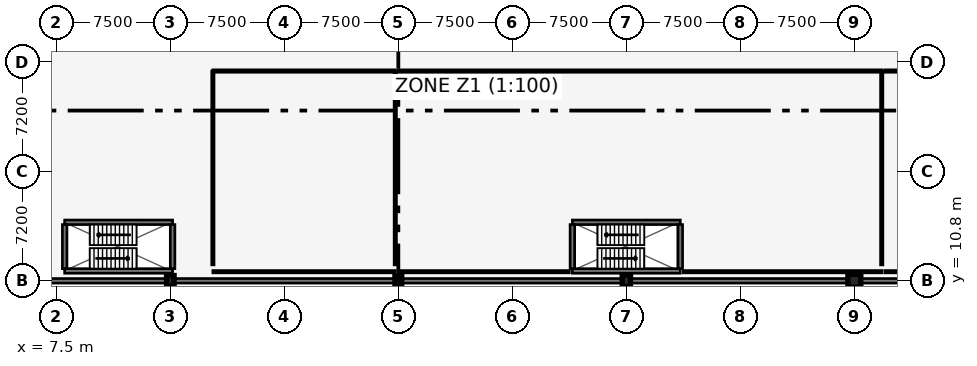
"""IFC4 building model, lengths in metres.
Left out: names, types, materials, properties, quantities, classifications, styles, units other than length and angle.
Written with IfcOpenShell. Run it as: python <this file> out.ifc"""

import sys

from ifc_helpers import new_model, si_unit, direction, frame, frame_2d, origin, origin_2d, place, context, subcontext, project, spatial, rectangle, extrude, element, fill, save


model = new_model("IFC4")
c1 = context("Model", 3, precision=1e-05, world=origin(), true_north=direction((0.0, 1.0)))
c2 = subcontext(c1, "Body", "Model", "MODEL_VIEW")
j1 = project(units=[si_unit("LENGTHUNIT", "METRE"), si_unit("PLANEANGLEUNIT", "RADIAN")], contexts=[c1])
p1 = place(None, origin())
s1 = spatial("IfcSite", under=j1, at=p1, CompositionType="ELEMENT")
p2 = place(p1, origin())
s2 = spatial("IfcBuilding", under=s1, at=p2, CompositionType="ELEMENT")
p3 = place(p2, frame((0.0, 0.0, 4.8)))
s3 = spatial("IfcBuildingStorey", under=s2, at=p3, CompositionType="ELEMENT", Elevation=4.8)
p4 = place(p3, frame((15.0, 10.8, 0.0), z_axis=(0.0, 0.0, 1.0), x_axis=(1.0, 0.0, 0.0)))
e1 = element("IfcColumn", 1, at=p4, inside=s3, PredefinedType="COLUMN", context=c2, shape_type="SweptSolid", body=[
    extrude(rectangle(XDim=0.5, YDim=0.7, at=origin_2d()), origin(), (0.0, 0.0, 1.0), 4.2),
])
p5 = place(p3, frame((30.0, 10.8, 0.0), z_axis=(0.0, 0.0, 1.0), x_axis=(1.0, 0.0, 0.0)))
e2 = element("IfcColumn", 2, at=p5, inside=s3, PredefinedType="COLUMN", context=c2, shape_type="SweptSolid", body=[
    extrude(rectangle(XDim=0.45, YDim=0.6, at=origin_2d()), origin(), (0.0, 0.0, 1.0), 4.2),
])
p6 = place(p3, frame((45.0, 10.8, 0.0), z_axis=(0.0, 0.0, 1.0), x_axis=(1.0, 0.0, 0.0)))
e3 = element("IfcColumn", 3, at=p6, inside=s3, PredefinedType="COLUMN", context=c2, shape_type="SweptSolid", body=[
    extrude(rectangle(XDim=0.55, YDim=0.75, at=origin_2d()), origin(), (0.0, 0.0, 1.0), 4.2),
])
p7 = place(p3, frame((60.0, 10.8, 0.0), z_axis=(0.0, 0.0, 1.0), x_axis=(1.0, 0.0, 0.0)))
e4 = element("IfcColumn", 4, at=p7, inside=s3, PredefinedType="COLUMN", context=c2, shape_type="SweptSolid", body=[
    extrude(rectangle(XDim=0.85, YDim=0.85, at=origin_2d()), origin(), (0.0, 0.0, 1.0), 4.2),
])
p8 = place(p3, frame((0.0, 10.8, 0.0), z_axis=(0.0, 0.0, 1.0), x_axis=(1.0, 0.0, 0.0)))
e5 = element("IfcWall", 5, at=p8, inside=s3, PredefinedType="SOLIDWALL", context=c2, shape_type="SweptSolid", body=[
    extrude(rectangle(XDim=93.6, YDim=0.3, at=frame_2d((46.8, 0.0))), origin(), (0.0, 0.0, 1.0), 3.5),
])
p9 = place(p8, frame((2.2, 0.0, 0.72)))
e6 = element("IfcOpeningElement", 6, at=p9, cuts=e5, PredefinedType="OPENING", context=c2, shape_type="SweptSolid", body=[
    extrude(rectangle(XDim=1.2, YDim=2.0, at=frame_2d((0.6, 1.0))), frame((0.0, 0.16, 0.0), z_axis=(0.0, -1.0, 0.0), x_axis=(1.0, 0.0, 0.0)), (0.0, 0.0, 1.0), 0.32),
])
p10 = place(p8, frame((9.4, 0.0, 0.72)))
e7 = element("IfcOpeningElement", 7, at=p10, cuts=e5, PredefinedType="OPENING", context=c2, shape_type="SweptSolid", body=[
    extrude(rectangle(XDim=1.35, YDim=2.05, at=frame_2d((0.675, 1.025))), frame((0.0, 0.16, 0.0), z_axis=(0.0, -1.0, 0.0), x_axis=(1.0, 0.0, 0.0)), (0.0, 0.0, 1.0), 0.32),
])
p11 = place(p8, frame((16.6, 0.0, 0.72)))
e8 = element("IfcOpeningElement", 8, at=p11, cuts=e5, PredefinedType="OPENING", context=c2, shape_type="SweptSolid", body=[
    extrude(rectangle(XDim=1.5, YDim=2.1, at=frame_2d((0.75, 1.05))), frame((0.0, 0.16, 0.0), z_axis=(0.0, -1.0, 0.0), x_axis=(1.0, 0.0, 0.0)), (0.0, 0.0, 1.0), 0.32),
])
p12 = place(p8, frame((23.8, 0.0, 0.72)))
e9 = element("IfcOpeningElement", 9, at=p12, cuts=e5, PredefinedType="OPENING", context=c2, shape_type="SweptSolid", body=[
    extrude(rectangle(XDim=1.65, YDim=2.1, at=frame_2d((0.825, 1.05))), frame((0.0, 0.16, 0.0), z_axis=(0.0, -1.0, 0.0), x_axis=(1.0, 0.0, 0.0)), (0.0, 0.0, 1.0), 0.32),
])
p13 = place(p8, frame((31.0, 0.0, 0.72)))
e10 = element("IfcOpeningElement", 10, at=p13, cuts=e5, PredefinedType="OPENING", context=c2, shape_type="SweptSolid", body=[
    extrude(rectangle(XDim=1.8, YDim=2.15, at=frame_2d((0.9, 1.075))), frame((0.0, 0.16, 0.0), z_axis=(0.0, -1.0, 0.0), x_axis=(1.0, 0.0, 0.0)), (0.0, 0.0, 1.0), 0.32),
])
p14 = place(p8, frame((38.2, 0.0, 0.72)))
e11 = element("IfcOpeningElement", 11, at=p14, cuts=e5, PredefinedType="OPENING", context=c2, shape_type="SweptSolid", body=[
    extrude(rectangle(XDim=1.2, YDim=2.0, at=frame_2d((0.6, 1.0))), frame((0.0, 0.16, 0.0), z_axis=(0.0, -1.0, 0.0), x_axis=(1.0, 0.0, 0.0)), (0.0, 0.0, 1.0), 0.32),
])
p15 = place(p8, frame((52.6, 0.0, 0.72)))
e12 = element("IfcOpeningElement", 12, at=p15, cuts=e5, PredefinedType="OPENING", context=c2, shape_type="SweptSolid", body=[
    extrude(rectangle(XDim=1.5, YDim=2.1, at=frame_2d((0.75, 1.05))), frame((0.0, 0.16, 0.0), z_axis=(0.0, -1.0, 0.0), x_axis=(1.0, 0.0, 0.0)), (0.0, 0.0, 1.0), 0.32),
])
p16 = place(p8, frame((67.0, 0.0, 0.72)))
e13 = element("IfcOpeningElement", 13, at=p16, cuts=e5, PredefinedType="OPENING", context=c2, shape_type="SweptSolid", body=[
    extrude(rectangle(XDim=1.8, YDim=2.15, at=frame_2d((0.9, 1.075))), frame((0.0, 0.16, 0.0), z_axis=(0.0, -1.0, 0.0), x_axis=(1.0, 0.0, 0.0)), (0.0, 0.0, 1.0), 0.32),
])
p17 = place(p8, frame((81.4, 0.0, 0.72)))
e14 = element("IfcOpeningElement", 14, at=p17, cuts=e5, PredefinedType="OPENING", context=c2, shape_type="SweptSolid", body=[
    extrude(rectangle(XDim=1.35, YDim=2.05, at=frame_2d((0.675, 1.025))), frame((0.0, 0.16, 0.0), z_axis=(0.0, -1.0, 0.0), x_axis=(1.0, 0.0, 0.0)), (0.0, 0.0, 1.0), 0.32),
])
for number, where, z_axis, x_axis in (
    (15, (8.05, 11.45, 0.0), (0.0, 0.0, 1.0), (1.0, 0.0, 0.0)),
    (16, (15.15, 14.65, 0.0), (0.0, 0.0, 1.0), (-1.0, 0.0, 0.0)),
):
    element("IfcWall", number, at=place(p3, frame(where, z_axis=z_axis, x_axis=x_axis)), inside=s3, PredefinedType="SHEAR", context=c2, shape_type="SweptSolid", body=[
        extrude(rectangle(XDim=7.1, YDim=0.3, at=frame_2d((3.55, 0.0))), origin(), (0.0, 0.0, 1.0), 3.9),
    ])
p18 = place(p3, frame((15.15, 11.6, 0.0), z_axis=(0.0, 0.0, 1.0), x_axis=(0.0, 1.0, 0.0)))
e17 = element("IfcWall", 17, at=p18, inside=s3, PredefinedType="SHEAR", context=c2, shape_type="SweptSolid", body=[
    extrude(rectangle(XDim=2.9, YDim=0.3, at=frame_2d((1.45, 0.0))), origin(), (0.0, 0.0, 1.0), 3.9),
])
p19 = place(p3, frame((8.05, 14.5, 0.0), z_axis=(0.0, 0.0, 1.0), x_axis=(0.0, -1.0, 0.0)))
e18 = element("IfcWall", 18, at=p19, inside=s3, PredefinedType="SHEAR", context=c2, shape_type="SweptSolid", body=[
    extrude(rectangle(XDim=2.9, YDim=0.3, at=frame_2d((1.45, 0.0))), origin(), (0.0, 0.0, 1.0), 3.9),
])
p20 = place(p19, frame((0.75, 0.0, 0.0)))
e19 = element("IfcOpeningElement", 19, at=p20, cuts=e18, PredefinedType="OPENING", context=c2, shape_type="SweptSolid", body=[
    extrude(rectangle(XDim=1.05, YDim=2.15, at=frame_2d((0.525, 1.075))), frame((0.0, 0.16, 0.0), z_axis=(0.0, -1.0, 0.0), x_axis=(1.0, 0.0, 0.0)), (0.0, 0.0, 1.0), 0.32),
])
for number, where, z_axis, x_axis in (
    (20, (41.45, 11.45, 0.0), (0.0, 0.0, 1.0), (1.0, 0.0, 0.0)),
    (21, (48.55, 14.65, 0.0), (0.0, 0.0, 1.0), (-1.0, 0.0, 0.0)),
):
    element("IfcWall", number, at=place(p3, frame(where, z_axis=z_axis, x_axis=x_axis)), inside=s3, PredefinedType="SHEAR", context=c2, shape_type="SweptSolid", body=[
        extrude(rectangle(XDim=7.1, YDim=0.3, at=frame_2d((3.55, 0.0))), origin(), (0.0, 0.0, 1.0), 3.9),
    ])
p21 = place(p3, frame((48.55, 11.6, 0.0), z_axis=(0.0, 0.0, 1.0), x_axis=(0.0, 1.0, 0.0)))
e22 = element("IfcWall", 22, at=p21, inside=s3, PredefinedType="SHEAR", context=c2, shape_type="SweptSolid", body=[
    extrude(rectangle(XDim=2.9, YDim=0.3, at=frame_2d((1.45, 0.0))), origin(), (0.0, 0.0, 1.0), 3.9),
])
p22 = place(p3, frame((41.45, 14.5, 0.0), z_axis=(0.0, 0.0, 1.0), x_axis=(0.0, -1.0, 0.0)))
e23 = element("IfcWall", 23, at=p22, inside=s3, PredefinedType="SHEAR", context=c2, shape_type="SweptSolid", body=[
    extrude(rectangle(XDim=2.9, YDim=0.3, at=frame_2d((1.45, 0.0))), origin(), (0.0, 0.0, 1.0), 3.9),
])
p23 = place(p22, frame((0.75, 0.0, 0.0)))
e24 = element("IfcOpeningElement", 24, at=p23, cuts=e23, PredefinedType="OPENING", context=c2, shape_type="SweptSolid", body=[
    extrude(rectangle(XDim=1.05, YDim=2.15, at=frame_2d((0.525, 1.075))), frame((0.0, 0.16, 0.0), z_axis=(0.0, -1.0, 0.0), x_axis=(1.0, 0.0, 0.0)), (0.0, 0.0, 1.0), 0.32),
])
p24 = place(p3, frame((29.8, 11.4, 0.0), z_axis=(0.0, 0.0, 1.0), x_axis=(-1.0, 0.0, 0.0)))
e25 = element("IfcWall", 25, at=p24, inside=s3, PredefinedType="PARTITIONING", context=c2, shape_type="SweptSolid", body=[
    extrude(rectangle(XDim=12.0, YDim=0.15, at=frame_2d((6.0, 0.0))), origin(), (0.0, 0.0, 1.0), 3.6),
])
p25 = place(p3, frame((29.8, 11.85, 0.0), z_axis=(0.0, 0.0, 1.0), x_axis=(0.0, 1.0, 0.0)))
e26 = element("IfcWall", 26, at=p25, inside=s3, PredefinedType="PARTITIONING", context=c2, shape_type="SweptSolid", body=[
    extrude(rectangle(XDim=12.75, YDim=0.15, at=frame_2d((6.375, 0.0))), origin(), (0.0, 0.0, 1.0), 3.082),
])
p26 = place(p3, frame((17.8, 24.6, 0.0), z_axis=(0.0, 0.0, 1.0), x_axis=(0.0, -1.0, 0.0)))
e27 = element("IfcWall", 27, at=p26, inside=s3, PredefinedType="PARTITIONING", context=c2, shape_type="SweptSolid", body=[
    extrude(rectangle(XDim=12.75, YDim=0.15, at=frame_2d((6.375, 0.0))), origin(), (0.0, 0.0, 1.0), 3.6),
])
p27 = place(p3, frame((17.8, 24.6, 0.0), z_axis=(0.0, 0.0, 1.0), x_axis=(1.0, 0.0, 0.0)))
e28 = element("IfcWall", 28, at=p27, inside=s3, PredefinedType="PARTITIONING", context=c2, shape_type="SweptSolid", body=[
    extrude(rectangle(XDim=12.0, YDim=0.16, at=frame_2d((6.0, 0.0))), origin(), (0.0, 0.0, 1.0), 3.6),
])
p28 = place(p27, frame((5.0, 0.0, 0.0)))
e29 = element("IfcOpeningElement", 29, at=p28, cuts=e28, PredefinedType="OPENING", context=c2, shape_type="SweptSolid", body=[
    extrude(rectangle(XDim=2.0, YDim=2.3, at=frame_2d((1.0, 1.15))), frame((0.0, 0.09, 0.0), z_axis=(0.0, -1.0, 0.0), x_axis=(1.0, 0.0, 0.0)), (0.0, 0.0, 1.0), 0.18),
])
p29 = place(p3, frame((61.8, 11.4, 0.0), z_axis=(0.0, 0.0, 1.0), x_axis=(-1.0, 0.0, 0.0)))
e30 = element("IfcWall", 30, at=p29, inside=s3, PredefinedType="PARTITIONING", context=c2, shape_type="SweptSolid", body=[
    extrude(rectangle(XDim=13.05, YDim=0.15, at=frame_2d((6.525, 0.0))), origin(), (0.0, 0.0, 1.0), 3.082),
])
p30 = place(p3, frame((41.25, 11.4, 0.0), z_axis=(0.0, 0.0, 1.0), x_axis=(-1.0, 0.0, 0.0)))
e31 = element("IfcWall", 31, at=p30, inside=s3, PredefinedType="PARTITIONING", context=c2, shape_type="SweptSolid", body=[
    extrude(rectangle(XDim=11.25, YDim=0.15, at=frame_2d((5.625, 0.0))), origin(), (0.0, 0.0, 1.0), 3.082),
])
p31 = place(p3, frame((61.8, 11.85, 0.0), z_axis=(0.0, 0.0, 1.0), x_axis=(0.0, 1.0, 0.0)))
e32 = element("IfcWall", 32, at=p31, inside=s3, PredefinedType="PARTITIONING", context=c2, shape_type="SweptSolid", body=[
    extrude(rectangle(XDim=12.75, YDim=0.15, at=frame_2d((6.375, 0.0))), origin(), (0.0, 0.0, 1.0), 3.6),
])
p32 = place(p3, frame((30.0, 24.6, 0.0), z_axis=(0.0, 0.0, 1.0), x_axis=(1.0, 0.0, 0.0)))
e33 = element("IfcWall", 33, at=p32, inside=s3, PredefinedType="PARTITIONING", context=c2, shape_type="SweptSolid", body=[
    extrude(rectangle(XDim=31.8, YDim=0.16, at=frame_2d((15.9, 0.0))), origin(), (0.0, 0.0, 1.0), 3.082),
])
p33 = place(p32, frame((14.9, 0.0, 0.0)))
e34 = element("IfcOpeningElement", 34, at=p33, cuts=e33, PredefinedType="OPENING", context=c2, shape_type="SweptSolid", body=[
    extrude(rectangle(XDim=2.0, YDim=2.3, at=frame_2d((1.0, 1.15))), frame((0.0, 0.09, 0.0), z_axis=(0.0, -1.0, 0.0), x_axis=(1.0, 0.0, 0.0)), (0.0, 0.0, 1.0), 0.18),
])
p34 = place(p32, frame((26.6, 0.0, 0.0)))
e35 = element("IfcOpeningElement", 35, at=p34, cuts=e33, PredefinedType="OPENING", context=c2, shape_type="SweptSolid", body=[
    extrude(rectangle(XDim=2.0, YDim=2.3, at=frame_2d((1.0, 1.15))), frame((0.0, 0.09, 0.0), z_axis=(0.0, -1.0, 0.0), x_axis=(1.0, 0.0, 0.0)), (0.0, 0.0, 1.0), 0.18),
])
p35 = place(p3, frame((73.2, 11.4, 0.0), z_axis=(0.0, 0.0, 1.0), x_axis=(-1.0, 0.0, 0.0)))
e36 = element("IfcWall", 36, at=p35, inside=s3, PredefinedType="PARTITIONING", context=c2, shape_type="SweptSolid", body=[
    extrude(rectangle(XDim=11.2, YDim=0.15, at=frame_2d((5.6, 0.0))), origin(), (0.0, 0.0, 1.0), 3.6),
])
p36 = place(p3, frame((62.0, 24.6, 0.0), z_axis=(0.0, 0.0, 1.0), x_axis=(1.0, 0.0, 0.0)))
e37 = element("IfcWall", 37, at=p36, inside=s3, PredefinedType="PARTITIONING", context=c2, shape_type="SweptSolid", body=[
    extrude(rectangle(XDim=11.2, YDim=0.16, at=frame_2d((5.6, 0.0))), origin(), (0.0, 0.0, 1.0), 3.6),
])
p37 = place(p36, frame((4.6, 0.0, 0.0)))
e38 = element("IfcOpeningElement", 38, at=p37, cuts=e37, PredefinedType="OPENING", context=c2, shape_type="SweptSolid", body=[
    extrude(rectangle(XDim=2.0, YDim=2.3, at=frame_2d((1.0, 1.15))), frame((0.0, 0.09, 0.0), z_axis=(0.0, -1.0, 0.0), x_axis=(1.0, 0.0, 0.0)), (0.0, 0.0, 1.0), 0.18),
])
p38 = place(p10, origin())
e39 = element("IfcWindow", 39, at=p38, inside=s3, PartitioningType="SINGLE_PANEL", PredefinedType="WINDOW", context=c2, shape_type="SweptSolid", body=[
    extrude(rectangle(XDim=1.35, YDim=2.05, at=frame_2d((0.675, 1.025))), frame((0.0, 0.03, 0.0), z_axis=(0.0, -1.0, 0.0), x_axis=(1.0, 0.0, 0.0)), (0.0, 0.0, 1.0), 0.06),
])
fill(e7, e39)
p39 = place(p11, origin())
e40 = element("IfcWindow", 40, at=p39, inside=s3, PartitioningType="SINGLE_PANEL", PredefinedType="WINDOW", context=c2, shape_type="SweptSolid", body=[
    extrude(rectangle(XDim=1.5, YDim=2.1, at=frame_2d((0.75, 1.05))), frame((0.0, 0.03, 0.0), z_axis=(0.0, -1.0, 0.0), x_axis=(1.0, 0.0, 0.0)), (0.0, 0.0, 1.0), 0.06),
])
fill(e8, e40)
p40 = place(p12, origin())
e41 = element("IfcWindow", 41, at=p40, inside=s3, PartitioningType="SINGLE_PANEL", PredefinedType="WINDOW", context=c2, shape_type="SweptSolid", body=[
    extrude(rectangle(XDim=1.65, YDim=2.1, at=frame_2d((0.825, 1.05))), frame((0.0, 0.03, 0.0), z_axis=(0.0, -1.0, 0.0), x_axis=(1.0, 0.0, 0.0)), (0.0, 0.0, 1.0), 0.06),
])
fill(e9, e41)
p41 = place(p13, origin())
e42 = element("IfcWindow", 42, at=p41, inside=s3, PartitioningType="SINGLE_PANEL", PredefinedType="WINDOW", context=c2, shape_type="SweptSolid", body=[
    extrude(rectangle(XDim=1.8, YDim=2.15, at=frame_2d((0.9, 1.075))), frame((0.0, 0.03, 0.0), z_axis=(0.0, -1.0, 0.0), x_axis=(1.0, 0.0, 0.0)), (0.0, 0.0, 1.0), 0.06),
])
fill(e10, e42)
p42 = place(p14, origin())
e43 = element("IfcWindow", 43, at=p42, inside=s3, PartitioningType="SINGLE_PANEL", PredefinedType="WINDOW", context=c2, shape_type="SweptSolid", body=[
    extrude(rectangle(XDim=1.2, YDim=2.0, at=frame_2d((0.6, 1.0))), frame((0.0, 0.03, 0.0), z_axis=(0.0, -1.0, 0.0), x_axis=(1.0, 0.0, 0.0)), (0.0, 0.0, 1.0), 0.06),
])
fill(e11, e43)
p43 = place(p15, origin())
e44 = element("IfcWindow", 44, at=p43, inside=s3, PartitioningType="SINGLE_PANEL", PredefinedType="WINDOW", context=c2, shape_type="SweptSolid", body=[
    extrude(rectangle(XDim=1.5, YDim=2.1, at=frame_2d((0.75, 1.05))), frame((0.0, 0.03, 0.0), z_axis=(0.0, -1.0, 0.0), x_axis=(1.0, 0.0, 0.0)), (0.0, 0.0, 1.0), 0.06),
])
fill(e12, e44)
p44 = place(p20, origin())
e45 = element("IfcDoor", 45, at=p44, inside=s3, OperationType="SINGLE_SWING_LEFT", PredefinedType="DOOR", context=c2, shape_type="SweptSolid", body=[
    extrude(rectangle(XDim=1.05, YDim=2.15, at=frame_2d((0.525, 1.075))), frame((0.0, 0.025, 0.0), z_axis=(0.0, -1.0, 0.0), x_axis=(1.0, 0.0, 0.0)), (0.0, 0.0, 1.0), 0.05),
])
fill(e19, e45)
p45 = place(p23, origin())
e46 = element("IfcDoor", 46, at=p45, inside=s3, OperationType="SINGLE_SWING_LEFT", PredefinedType="DOOR", context=c2, shape_type="SweptSolid", body=[
    extrude(rectangle(XDim=1.05, YDim=2.15, at=frame_2d((0.525, 1.075))), frame((0.0, 0.025, 0.0), z_axis=(0.0, -1.0, 0.0), x_axis=(1.0, 0.0, 0.0)), (0.0, 0.0, 1.0), 0.05),
])
fill(e24, e46)
p46 = place(p28, origin())
e47 = element("IfcDoor", 47, at=p46, inside=s3, OperationType="DOUBLE_SWING_LEFT", PredefinedType="DOOR", context=c2, shape_type="SweptSolid", body=[
    extrude(rectangle(XDim=2.0, YDim=2.3, at=frame_2d((1.0, 1.15))), frame((0.0, 0.025, 0.0), z_axis=(0.0, -1.0, 0.0), x_axis=(1.0, 0.0, 0.0)), (0.0, 0.0, 1.0), 0.05),
])
fill(e29, e47)
p47 = place(p33, origin())
e48 = element("IfcDoor", 48, at=p47, inside=s3, OperationType="DOUBLE_SWING_LEFT", PredefinedType="DOOR", context=c2, shape_type="SweptSolid", body=[
    extrude(rectangle(XDim=2.0, YDim=2.3, at=frame_2d((1.0, 1.15))), frame((0.0, 0.025, 0.0), z_axis=(0.0, -1.0, 0.0), x_axis=(1.0, 0.0, 0.0)), (0.0, 0.0, 1.0), 0.05),
])
fill(e34, e48)
p48 = place(p34, origin())
e49 = element("IfcDoor", 49, at=p48, inside=s3, OperationType="DOUBLE_SWING_LEFT", PredefinedType="DOOR", context=c2, shape_type="SweptSolid", body=[
    extrude(rectangle(XDim=2.0, YDim=2.3, at=frame_2d((1.0, 1.15))), frame((0.0, 0.025, 0.0), z_axis=(0.0, -1.0, 0.0), x_axis=(1.0, 0.0, 0.0)), (0.0, 0.0, 1.0), 0.05),
])
fill(e35, e49)
save(model, sys.argv[1])
